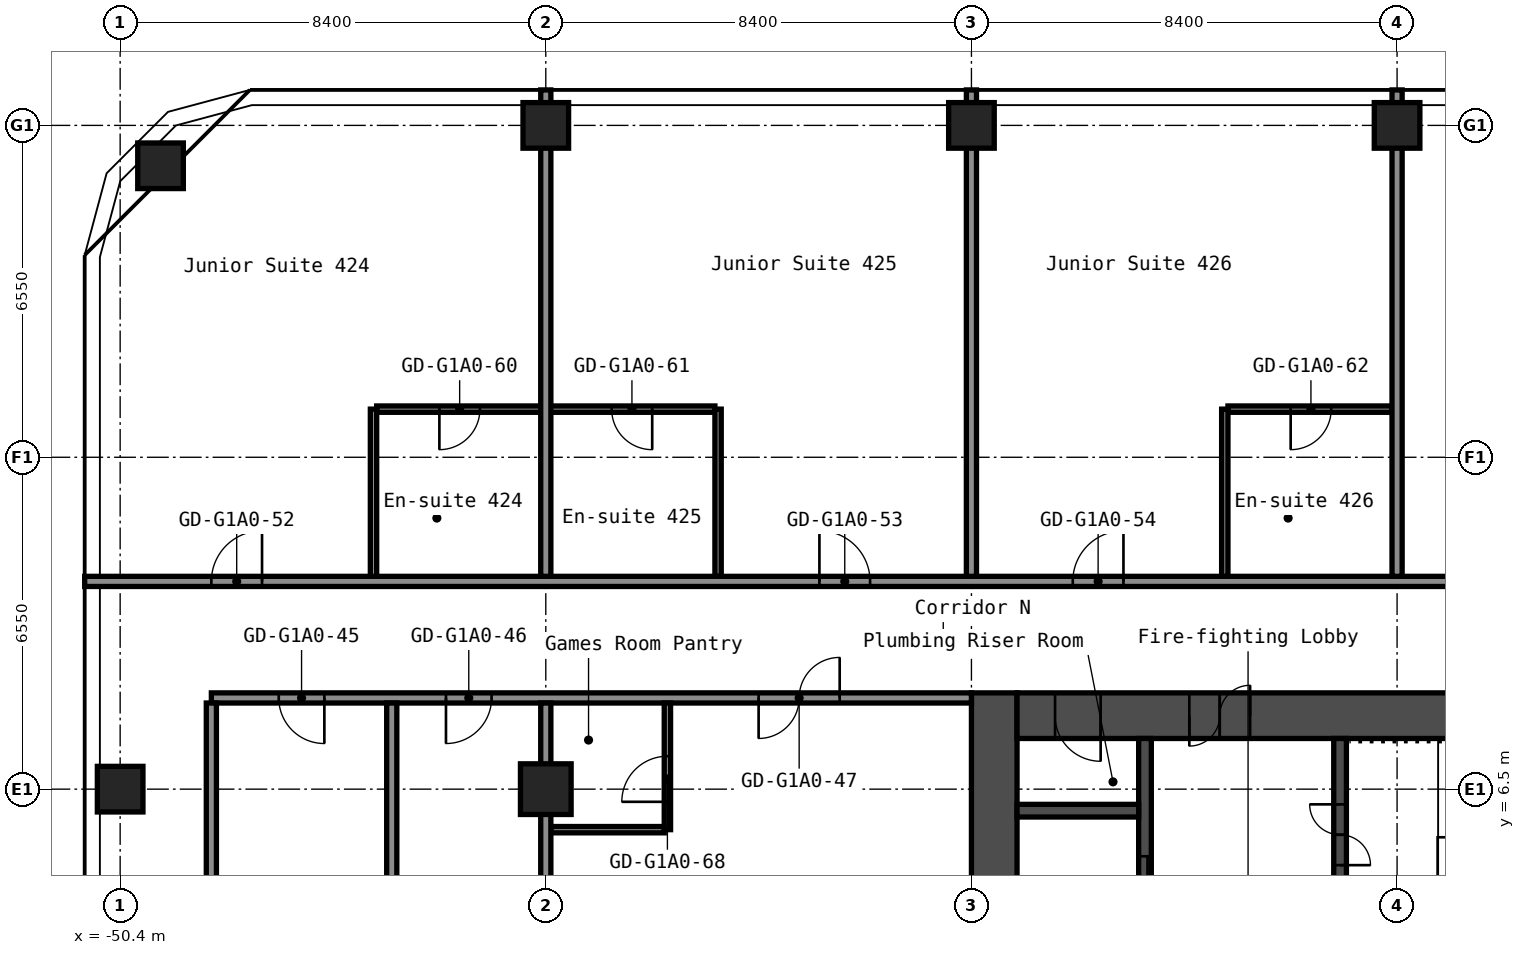
"""IFC4 building model, lengths in metres.
Left out: names, types, materials, properties, quantities, classifications, styles, units other than length and angle.
Written with IfcOpenShell. Run it as: python <this file> out.ifc"""

import sys

from ifc_helpers import new_model, si_unit, direction, frame, frame_2d, origin, origin_2d, place, context, subcontext, project, spatial, rectangle, hollow_rectangle, extrude, element, fill, save


model = new_model("IFC4")
c1 = context("Model", 3, precision=1e-05, world=origin(), true_north=direction((0.0, 1.0)))
c2 = subcontext(c1, "Body", "Model", "MODEL_VIEW")
j1 = project(units=[si_unit("LENGTHUNIT", "METRE"), si_unit("PLANEANGLEUNIT", "RADIAN")], contexts=[c1])
p1 = place(None, origin())
s1 = spatial("IfcSite", under=j1, at=p1, CompositionType="ELEMENT")
p2 = place(p1, origin())
s2 = spatial("IfcBuilding", under=s1, at=p2, CompositionType="ELEMENT")
p3 = place(p2, frame((0.0, 0.0, 19.8)))
s3 = spatial("IfcBuildingStorey", under=s2, at=p3, CompositionType="ELEMENT", Elevation=19.8)
for number, where, z_axis, x_axis in (
    (1, (-50.4, 6.5, 0.0), (0.0, 0.0, 1.0), (1.0, 0.0, 0.0)),
    (2, (-49.603, 18.803, 0.0), (0.0, 0.0, 1.0), (1.0, 0.0, 0.0)),
):
    element("IfcColumn", number, at=place(p3, frame(where, z_axis=z_axis, x_axis=x_axis)), inside=s3, PredefinedType="COLUMN", context=c2, shape_type="SweptSolid", body=[
        extrude(hollow_rectangle(XDim=0.9, YDim=0.9, WallThickness=0.036, at=origin_2d()), origin(), (0.0, 0.0, 1.0), 2.8),
    ])
p4 = place(p3, frame((-42.0, 6.5, 0.0), z_axis=(0.0, 0.0, 1.0), x_axis=(1.0, 0.0, 0.0)))
e3 = element("IfcColumn", 3, at=p4, inside=s3, PredefinedType="COLUMN", context=c2, shape_type="SweptSolid", body=[
    extrude(hollow_rectangle(XDim=1.0, YDim=1.0, WallThickness=0.04, at=origin_2d()), origin(), (0.0, 0.0, 1.0), 2.8),
])
for number, where, z_axis, x_axis in (
    (4, (-42.0, 19.6, 0.0), (0.0, 0.0, 1.0), (1.0, 0.0, 0.0)),
    (5, (-33.6, 19.6, 0.0), (0.0, 0.0, 1.0), (1.0, 0.0, 0.0)),
    (6, (-25.2, 19.6, 0.0), (0.0, 0.0, 1.0), (1.0, 0.0, 0.0)),
):
    element("IfcColumn", number, at=place(p3, frame(where, z_axis=z_axis, x_axis=x_axis)), inside=s3, PredefinedType="COLUMN", context=c2, shape_type="SweptSolid", body=[
        extrude(hollow_rectangle(XDim=0.9, YDim=0.9, WallThickness=0.036, at=origin_2d()), origin(), (0.0, 0.0, 1.0), 2.8),
    ])
p5 = place(p3, frame((-33.15, -8.4, 0.0), z_axis=(0.0, 0.0, 1.0), x_axis=(0.0, 1.0, 0.0)))
e7 = element("IfcWall", 7, at=p5, inside=s3, PredefinedType="SHEAR", context=c2, shape_type="SweptSolid", body=[
    extrude(rectangle(XDim=16.8, YDim=0.9, at=frame_2d((8.4, 0.0))), origin(), (0.0, 0.0, 1.0), 2.8),
])
p6 = place(p3, frame((-32.7, 7.95, 0.0), z_axis=(0.0, 0.0, 1.0), x_axis=(1.0, 0.0, 0.0)))
e8 = element("IfcWall", 8, at=p6, inside=s3, PredefinedType="SHEAR", context=c2, shape_type="SweptSolid", body=[
    extrude(rectangle(XDim=15.0, YDim=0.9, at=frame_2d((7.5, 0.0))), origin(), (0.0, 0.0, 1.0), 2.8),
])
p7 = place(p6, frame((3.4, 0.0, 0.0)))
e9 = element("IfcOpeningElement", 9, at=p7, cuts=e8, PredefinedType="OPENING", context=c2, shape_type="SweptSolid", body=[
    extrude(rectangle(XDim=1.2, YDim=2.1, at=frame_2d((0.6, 1.05))), frame((0.0, 0.46, 0.0), z_axis=(0.0, -1.0, 0.0), x_axis=(1.0, 0.0, 0.0)), (0.0, 0.0, 1.0), 0.92),
])
p8 = place(p6, frame((0.75, 0.0, 0.0)))
e10 = element("IfcOpeningElement", 10, at=p8, cuts=e8, PredefinedType="OPENING", context=c2, shape_type="SweptSolid", body=[
    extrude(rectangle(XDim=0.9, YDim=2.1, at=frame_2d((0.45, 1.05))), frame((0.0, 0.46, 0.0), z_axis=(0.0, -1.0, 0.0), x_axis=(1.0, 0.0, 0.0)), (0.0, 0.0, 1.0), 0.92),
])
p9 = place(p3, frame((-26.325, 3.75, 0.0), z_axis=(0.0, 0.0, 1.0), x_axis=(0.0, 1.0, 0.0)))
e11 = element("IfcWall", 11, at=p9, inside=s3, PredefinedType="SHEAR", context=c2, shape_type="SweptSolid", body=[
    extrude(rectangle(XDim=3.75, YDim=0.25, at=frame_2d((1.875, 0.0))), origin(), (0.0, 0.0, 1.0), 2.8),
])
p10 = place(p9, frame((1.25, 0.0, 0.0)))
e12 = element("IfcOpeningElement", 12, at=p10, cuts=e11, PredefinedType="OPENING", context=c2, shape_type="SweptSolid", body=[
    extrude(rectangle(XDim=1.2, YDim=2.1, at=frame_2d((0.6, 1.05))), frame((0.0, 0.135, 0.0), z_axis=(0.0, -1.0, 0.0), x_axis=(1.0, 0.0, 0.0)), (0.0, 0.0, 1.0), 0.27),
])
p11 = place(p3, frame((-30.175, 1.45, 0.0), z_axis=(0.0, 0.0, 1.0), x_axis=(0.0, 1.0, 0.0)))
e13 = element("IfcWall", 13, at=p11, inside=s3, PredefinedType="SHEAR", context=c2, shape_type="SweptSolid", body=[
    extrude(rectangle(XDim=6.05, YDim=0.25, at=frame_2d((3.025, 0.0))), origin(), (0.0, 0.0, 1.0), 2.8),
])
p12 = place(p11, frame((2.625, 0.0, 0.0)))
e14 = element("IfcOpeningElement", 14, at=p12, cuts=e13, PredefinedType="OPENING", context=c2, shape_type="SweptSolid", body=[
    extrude(rectangle(XDim=1.1, YDim=2.1, at=frame_2d((0.55, 1.05))), frame((0.0, 0.135, 0.0), z_axis=(0.0, -1.0, 0.0), x_axis=(1.0, 0.0, 0.0)), (0.0, 0.0, 1.0), 0.27),
])
p13 = place(p3, frame((-32.7, 6.075, 0.0), z_axis=(0.0, 0.0, 1.0), x_axis=(1.0, 0.0, 0.0)))
e15 = element("IfcWall", 15, at=p13, inside=s3, PredefinedType="SHEAR", context=c2, shape_type="SweptSolid", body=[
    extrude(rectangle(XDim=2.4, YDim=0.25, at=frame_2d((1.2, 0.0))), origin(), (0.0, 0.0, 1.0), 2.8),
])
p14 = place(p3, frame((-41.9, 5.7, 0.0), z_axis=(0.0, 0.0, 1.0), x_axis=(1.0, 0.0, 0.0)))
e16 = element("IfcWall", 16, at=p14, inside=s3, PredefinedType="PARTITIONING", context=c2, shape_type="SweptSolid", body=[
    extrude(rectangle(XDim=2.237, YDim=0.125, at=frame_2d((1.119, 0.0))), origin(), (0.0, 0.0, 1.0), 2.8),
])
p15 = place(p3, frame((-48.6, 8.3, 0.0), z_axis=(0.0, 0.0, 1.0), x_axis=(1.0, 0.0, 0.0)))
e17 = element("IfcWall", 17, at=p15, inside=s3, PredefinedType="PARTITIONING", context=c2, shape_type="SweptSolid", body=[
    extrude(rectangle(XDim=15.0, YDim=0.2, at=frame_2d((7.5, 0.0))), origin(), (0.0, 0.0, 1.0), 2.8),
])
p16 = place(p15, frame((1.33, 0.0, 0.0)))
e18 = element("IfcOpeningElement", 18, at=p16, cuts=e17, PredefinedType="OPENING", context=c2, shape_type="SweptSolid", body=[
    extrude(rectangle(XDim=0.9, YDim=2.1, at=frame_2d((0.45, 1.05))), frame((0.0, 0.11, 0.0), z_axis=(0.0, -1.0, 0.0), x_axis=(1.0, 0.0, 0.0)), (0.0, 0.0, 1.0), 0.22),
])
p17 = place(p15, frame((4.63, 0.0, 0.0)))
e19 = element("IfcOpeningElement", 19, at=p17, cuts=e17, PredefinedType="OPENING", context=c2, shape_type="SweptSolid", body=[
    extrude(rectangle(XDim=0.9, YDim=2.1, at=frame_2d((0.45, 1.05))), frame((0.0, 0.11, 0.0), z_axis=(0.0, -1.0, 0.0), x_axis=(1.0, 0.0, 0.0)), (0.0, 0.0, 1.0), 0.22),
])
p18 = place(p15, frame((10.8, 0.0, 0.0)))
e20 = element("IfcOpeningElement", 20, at=p18, cuts=e17, PredefinedType="OPENING", context=c2, shape_type="SweptSolid", body=[
    extrude(rectangle(XDim=1.6, YDim=2.1, at=frame_2d((0.8, 1.05))), frame((0.0, 0.11, 0.0), z_axis=(0.0, -1.0, 0.0), x_axis=(1.0, 0.0, 0.0)), (0.0, 0.0, 1.0), 0.22),
])
p19 = place(p3, frame((-51.1, 10.6, 0.0), z_axis=(0.0, 0.0, 1.0), x_axis=(1.0, 0.0, 0.0)))
e21 = element("IfcWall", 21, at=p19, inside=s3, PredefinedType="PARTITIONING", context=c2, shape_type="SweptSolid", body=[
    extrude(rectangle(XDim=34.3, YDim=0.2, at=frame_2d((17.15, 0.0))), origin(), (0.0, 0.0, 1.0), 2.8),
])
p20 = place(p19, frame((2.5, 0.0, 0.0)))
e22 = element("IfcOpeningElement", 22, at=p20, cuts=e21, PredefinedType="OPENING", context=c2, shape_type="SweptSolid", body=[
    extrude(rectangle(XDim=1.0, YDim=2.1, at=frame_2d((0.5, 1.05))), frame((0.0, 0.11, 0.0), z_axis=(0.0, -1.0, 0.0), x_axis=(1.0, 0.0, 0.0)), (0.0, 0.0, 1.0), 0.22),
])
p21 = place(p19, frame((14.5, 0.0, 0.0)))
e23 = element("IfcOpeningElement", 23, at=p21, cuts=e21, PredefinedType="OPENING", context=c2, shape_type="SweptSolid", body=[
    extrude(rectangle(XDim=1.0, YDim=2.1, at=frame_2d((0.5, 1.05))), frame((0.0, 0.11, 0.0), z_axis=(0.0, -1.0, 0.0), x_axis=(1.0, 0.0, 0.0)), (0.0, 0.0, 1.0), 0.22),
])
p22 = place(p19, frame((19.5, 0.0, 0.0)))
e24 = element("IfcOpeningElement", 24, at=p22, cuts=e21, PredefinedType="OPENING", context=c2, shape_type="SweptSolid", body=[
    extrude(rectangle(XDim=1.0, YDim=2.1, at=frame_2d((0.5, 1.05))), frame((0.0, 0.11, 0.0), z_axis=(0.0, -1.0, 0.0), x_axis=(1.0, 0.0, 0.0)), (0.0, 0.0, 1.0), 0.22),
])
p23 = place(p19, frame((27.9, 0.0, 0.0)))
e25 = element("IfcOpeningElement", 25, at=p23, cuts=e21, PredefinedType="OPENING", context=c2, shape_type="SweptSolid", body=[
    extrude(rectangle(XDim=1.0, YDim=2.1, at=frame_2d((0.5, 1.05))), frame((0.0, 0.11, 0.0), z_axis=(0.0, -1.0, 0.0), x_axis=(1.0, 0.0, 0.0)), (0.0, 0.0, 1.0), 0.22),
])
p24 = place(p3, frame((-45.337, 14.0, 0.0), z_axis=(0.0, 0.0, 1.0), x_axis=(1.0, 0.0, 0.0)))
e26 = element("IfcWall", 26, at=p24, inside=s3, PredefinedType="PARTITIONING", context=c2, shape_type="SweptSolid", body=[
    extrude(rectangle(XDim=6.675, YDim=0.125, at=frame_2d((3.337, 0.0))), origin(), (0.0, 0.0, 1.0), 2.8),
])
p25 = place(p24, frame((1.238, 0.0, 0.0)))
e27 = element("IfcOpeningElement", 27, at=p25, cuts=e26, PredefinedType="OPENING", context=c2, shape_type="SweptSolid", body=[
    extrude(rectangle(XDim=0.8, YDim=2.1, at=frame_2d((0.4, 1.05))), frame((0.0, 0.073, 0.0), z_axis=(0.0, -1.0, 0.0), x_axis=(1.0, 0.0, 0.0)), (0.0, 0.0, 1.0), 0.145),
])
p26 = place(p24, frame((4.637, 0.0, 0.0)))
e28 = element("IfcOpeningElement", 28, at=p26, cuts=e26, PredefinedType="OPENING", context=c2, shape_type="SweptSolid", body=[
    extrude(rectangle(XDim=0.8, YDim=2.1, at=frame_2d((0.4, 1.05))), frame((0.0, 0.073, 0.0), z_axis=(0.0, -1.0, 0.0), x_axis=(1.0, 0.0, 0.0)), (0.0, 0.0, 1.0), 0.145),
])
p27 = place(p3, frame((-28.538, 14.0, 0.0), z_axis=(0.0, 0.0, 1.0), x_axis=(1.0, 0.0, 0.0)))
e29 = element("IfcWall", 29, at=p27, inside=s3, PredefinedType="PARTITIONING", context=c2, shape_type="SweptSolid", body=[
    extrude(rectangle(XDim=3.238, YDim=0.125, at=frame_2d((1.619, 0.0))), origin(), (0.0, 0.0, 1.0), 2.8),
])
p28 = place(p27, frame((1.238, 0.0, 0.0)))
e30 = element("IfcOpeningElement", 30, at=p28, cuts=e29, PredefinedType="OPENING", context=c2, shape_type="SweptSolid", body=[
    extrude(rectangle(XDim=0.8, YDim=2.1, at=frame_2d((0.4, 1.05))), frame((0.0, 0.073, 0.0), z_axis=(0.0, -1.0, 0.0), x_axis=(1.0, 0.0, 0.0)), (0.0, 0.0, 1.0), 0.145),
])
p29 = place(p3, frame((-48.6, -8.2, 0.0), z_axis=(0.0, 0.0, 1.0), x_axis=(0.0, 1.0, 0.0)))
e31 = element("IfcWall", 31, at=p29, inside=s3, PredefinedType="PARTITIONING", context=c2, shape_type="SweptSolid", body=[
    extrude(rectangle(XDim=16.4, YDim=0.2, at=frame_2d((8.2, 0.0))), origin(), (0.0, 0.0, 1.0), 2.8),
])
p30 = place(p3, frame((-45.4, 10.7, 0.0), z_axis=(0.0, 0.0, 1.0), x_axis=(0.0, 1.0, 0.0)))
e32 = element("IfcWall", 32, at=p30, inside=s3, PredefinedType="PARTITIONING", context=c2, shape_type="SweptSolid", body=[
    extrude(rectangle(XDim=3.3, YDim=0.125, at=frame_2d((1.65, 0.0))), origin(), (0.0, 0.0, 1.0), 2.8),
])
p31 = place(p3, frame((-45.04, 0.0, 0.0), z_axis=(0.0, 0.0, 1.0), x_axis=(0.0, 1.0, 0.0)))
e33 = element("IfcWall", 33, at=p31, inside=s3, PredefinedType="PARTITIONING", context=c2, shape_type="SweptSolid", body=[
    extrude(rectangle(XDim=8.2, YDim=0.2, at=frame_2d((4.1, 0.0))), origin(), (0.0, 0.0, 1.0), 2.8),
])
p32 = place(p3, frame((-42.0, -8.2, 0.0), z_axis=(0.0, 0.0, 1.0), x_axis=(0.0, 1.0, 0.0)))
e34 = element("IfcWall", 34, at=p32, inside=s3, PredefinedType="PARTITIONING", context=c2, shape_type="SweptSolid", body=[
    extrude(rectangle(XDim=16.4, YDim=0.2, at=frame_2d((8.2, 0.0))), origin(), (0.0, 0.0, 1.0), 2.8),
])
p33 = place(p3, frame((-42.0, 10.7, 0.0), z_axis=(0.0, 0.0, 1.0), x_axis=(0.0, 1.0, 0.0)))
e35 = element("IfcWall", 35, at=p33, inside=s3, PredefinedType="PARTITIONING", context=c2, shape_type="SweptSolid", body=[
    extrude(rectangle(XDim=9.6, YDim=0.2, at=frame_2d((4.8, 0.0))), origin(), (0.0, 0.0, 1.0), 2.8),
])
p34 = place(p3, frame((-39.6, 5.7, 0.0), z_axis=(0.0, 0.0, 1.0), x_axis=(0.0, 1.0, 0.0)))
e36 = element("IfcWall", 36, at=p34, inside=s3, PredefinedType="PARTITIONING", context=c2, shape_type="SweptSolid", body=[
    extrude(rectangle(XDim=2.5, YDim=0.125, at=frame_2d((1.25, 0.0))), origin(), (0.0, 0.0, 1.0), 2.8),
])
p35 = place(p34, frame((0.55, 0.0, 0.0)))
e37 = element("IfcOpeningElement", 37, at=p35, cuts=e36, PredefinedType="OPENING", context=c2, shape_type="SweptSolid", body=[
    extrude(rectangle(XDim=0.9, YDim=2.1, at=frame_2d((0.45, 1.05))), frame((0.0, 0.073, 0.0), z_axis=(0.0, -1.0, 0.0), x_axis=(1.0, 0.0, 0.0)), (0.0, 0.0, 1.0), 0.145),
])
p36 = place(p3, frame((-38.6, 10.7, 0.0), z_axis=(0.0, 0.0, 1.0), x_axis=(0.0, 1.0, 0.0)))
e38 = element("IfcWall", 38, at=p36, inside=s3, PredefinedType="PARTITIONING", context=c2, shape_type="SweptSolid", body=[
    extrude(rectangle(XDim=3.3, YDim=0.125, at=frame_2d((1.65, 0.0))), origin(), (0.0, 0.0, 1.0), 2.8),
])
p37 = place(p3, frame((-33.6, 10.7, 0.0), z_axis=(0.0, 0.0, 1.0), x_axis=(0.0, 1.0, 0.0)))
e39 = element("IfcWall", 39, at=p37, inside=s3, PredefinedType="PARTITIONING", context=c2, shape_type="SweptSolid", body=[
    extrude(rectangle(XDim=9.6, YDim=0.2, at=frame_2d((4.8, 0.0))), origin(), (0.0, 0.0, 1.0), 2.8),
])
p38 = place(p3, frame((-28.6, 10.7, 0.0), z_axis=(0.0, 0.0, 1.0), x_axis=(0.0, 1.0, 0.0)))
e40 = element("IfcWall", 40, at=p38, inside=s3, PredefinedType="PARTITIONING", context=c2, shape_type="SweptSolid", body=[
    extrude(rectangle(XDim=3.3, YDim=0.125, at=frame_2d((1.65, 0.0))), origin(), (0.0, 0.0, 1.0), 2.8),
])
p39 = place(p3, frame((-25.2, 10.7, 0.0), z_axis=(0.0, 0.0, 1.0), x_axis=(0.0, 1.0, 0.0)))
e41 = element("IfcWall", 41, at=p39, inside=s3, PredefinedType="PARTITIONING", context=c2, shape_type="SweptSolid", body=[
    extrude(rectangle(XDim=9.6, YDim=0.2, at=frame_2d((4.8, 0.0))), origin(), (0.0, 0.0, 1.0), 2.8),
])
p40 = place(p7, origin())
e42 = element("IfcDoor", 42, at=p40, inside=s3, OperationType="DOUBLE_DOOR_SINGLE_SWING", PredefinedType="DOOR", context=c2, shape_type="SweptSolid", body=[
    extrude(rectangle(XDim=1.2, YDim=2.1, at=frame_2d((0.6, 1.05))), frame((0.0, 0.025, 0.0), z_axis=(0.0, -1.0, 0.0), x_axis=(1.0, 0.0, 0.0)), (0.0, 0.0, 1.0), 0.05),
])
fill(e9, e42)
p41 = place(p8, origin())
e43 = element("IfcDoor", 43, at=p41, inside=s3, OperationType="SINGLE_SWING_RIGHT", PredefinedType="DOOR", context=c2, shape_type="SweptSolid", body=[
    extrude(rectangle(XDim=0.9, YDim=2.1, at=frame_2d((0.45, 1.05))), frame((0.0, 0.025, 0.0), z_axis=(0.0, -1.0, 0.0), x_axis=(1.0, 0.0, 0.0)), (0.0, 0.0, 1.0), 0.05),
])
fill(e10, e43)
p42 = place(p10, origin())
e44 = element("IfcDoor", 44, at=p42, inside=s3, OperationType="DOUBLE_DOOR_SINGLE_SWING", PredefinedType="DOOR", context=c2, shape_type="SweptSolid", body=[
    extrude(rectangle(XDim=1.2, YDim=2.1, at=frame_2d((0.6, 1.05))), frame((0.0, 0.025, 0.0), z_axis=(0.0, -1.0, 0.0), x_axis=(1.0, 0.0, 0.0)), (0.0, 0.0, 1.0), 0.05),
])
fill(e12, e44)
p43 = place(p12, origin())
e45 = element("IfcDoor", 45, at=p43, inside=s3, OperationType="DOUBLE_DOOR_SLIDING", PredefinedType="DOOR", context=c2, shape_type="SweptSolid", body=[
    extrude(rectangle(XDim=1.1, YDim=2.1, at=frame_2d((0.55, 1.05))), frame((0.0, 0.025, 0.0), z_axis=(0.0, -1.0, 0.0), x_axis=(1.0, 0.0, 0.0)), (0.0, 0.0, 1.0), 0.05),
])
fill(e14, e45)
p44 = place(p16, origin())
e46 = element("IfcDoor", 46, at=p44, inside=s3, OperationType="SINGLE_SWING_RIGHT", PredefinedType="DOOR", context=c2, shape_type="SweptSolid", body=[
    extrude(rectangle(XDim=0.9, YDim=2.1, at=frame_2d((0.45, 1.05))), frame((0.0, 0.025, 0.0), z_axis=(0.0, -1.0, 0.0), x_axis=(1.0, 0.0, 0.0)), (0.0, 0.0, 1.0), 0.05),
])
fill(e18, e46)
p45 = place(p17, origin())
e47 = element("IfcDoor", 47, at=p45, inside=s3, OperationType="SINGLE_SWING_LEFT", PredefinedType="DOOR", context=c2, shape_type="SweptSolid", body=[
    extrude(rectangle(XDim=0.9, YDim=2.1, at=frame_2d((0.45, 1.05))), frame((0.0, 0.025, 0.0), z_axis=(0.0, -1.0, 0.0), x_axis=(1.0, 0.0, 0.0)), (0.0, 0.0, 1.0), 0.05),
])
fill(e19, e47)
p46 = place(p18, origin())
e48 = element("IfcDoor", 48, at=p46, inside=s3, OperationType="DOUBLE_DOOR_SINGLE_SWING", PredefinedType="DOOR", context=c2, shape_type="SweptSolid", body=[
    extrude(rectangle(XDim=1.6, YDim=2.1, at=frame_2d((0.8, 1.05))), frame((0.0, 0.025, 0.0), z_axis=(0.0, -1.0, 0.0), x_axis=(1.0, 0.0, 0.0)), (0.0, 0.0, 1.0), 0.05),
])
fill(e20, e48)
p47 = place(p20, origin())
e49 = element("IfcDoor", 49, at=p47, inside=s3, OperationType="SINGLE_SWING_LEFT", PredefinedType="DOOR", context=c2, shape_type="SweptSolid", body=[
    extrude(rectangle(XDim=1.0, YDim=2.1, at=frame_2d((0.5, 1.05))), frame((0.0, 0.025, 0.0), z_axis=(0.0, -1.0, 0.0), x_axis=(1.0, 0.0, 0.0)), (0.0, 0.0, 1.0), 0.05),
])
fill(e22, e49)
p48 = place(p21, origin())
e50 = element("IfcDoor", 50, at=p48, inside=s3, OperationType="SINGLE_SWING_RIGHT", PredefinedType="DOOR", context=c2, shape_type="SweptSolid", body=[
    extrude(rectangle(XDim=1.0, YDim=2.1, at=frame_2d((0.5, 1.05))), frame((0.0, 0.025, 0.0), z_axis=(0.0, -1.0, 0.0), x_axis=(1.0, 0.0, 0.0)), (0.0, 0.0, 1.0), 0.05),
])
fill(e23, e50)
p49 = place(p22, origin())
e51 = element("IfcDoor", 51, at=p49, inside=s3, OperationType="SINGLE_SWING_LEFT", PredefinedType="DOOR", context=c2, shape_type="SweptSolid", body=[
    extrude(rectangle(XDim=1.0, YDim=2.1, at=frame_2d((0.5, 1.05))), frame((0.0, 0.025, 0.0), z_axis=(0.0, -1.0, 0.0), x_axis=(1.0, 0.0, 0.0)), (0.0, 0.0, 1.0), 0.05),
])
fill(e24, e51)
p50 = place(p25, origin())
e52 = element("IfcDoor", 52, at=p50, inside=s3, OperationType="SINGLE_SWING_LEFT", PredefinedType="DOOR", context=c2, shape_type="SweptSolid", body=[
    extrude(rectangle(XDim=0.8, YDim=2.1, at=frame_2d((0.4, 1.05))), frame((0.0, 0.025, 0.0), z_axis=(0.0, -1.0, 0.0), x_axis=(1.0, 0.0, 0.0)), (0.0, 0.0, 1.0), 0.05),
])
fill(e27, e52)
p51 = place(p26, origin())
e53 = element("IfcDoor", 53, at=p51, inside=s3, OperationType="SINGLE_SWING_RIGHT", PredefinedType="DOOR", context=c2, shape_type="SweptSolid", body=[
    extrude(rectangle(XDim=0.8, YDim=2.1, at=frame_2d((0.4, 1.05))), frame((0.0, 0.025, 0.0), z_axis=(0.0, -1.0, 0.0), x_axis=(1.0, 0.0, 0.0)), (0.0, 0.0, 1.0), 0.05),
])
fill(e28, e53)
p52 = place(p28, origin())
e54 = element("IfcDoor", 54, at=p52, inside=s3, OperationType="SINGLE_SWING_LEFT", PredefinedType="DOOR", context=c2, shape_type="SweptSolid", body=[
    extrude(rectangle(XDim=0.8, YDim=2.1, at=frame_2d((0.4, 1.05))), frame((0.0, 0.025, 0.0), z_axis=(0.0, -1.0, 0.0), x_axis=(1.0, 0.0, 0.0)), (0.0, 0.0, 1.0), 0.05),
])
fill(e30, e54)
p53 = place(p35, origin())
e55 = element("IfcDoor", 55, at=p53, inside=s3, OperationType="SINGLE_SWING_RIGHT", PredefinedType="DOOR", context=c2, shape_type="SweptSolid", body=[
    extrude(rectangle(XDim=0.9, YDim=2.1, at=frame_2d((0.45, 1.05))), frame((0.0, 0.025, 0.0), z_axis=(0.0, -1.0, 0.0), x_axis=(1.0, 0.0, 0.0)), (0.0, 0.0, 1.0), 0.05),
])
fill(e37, e55)
save(model, sys.argv[1])
